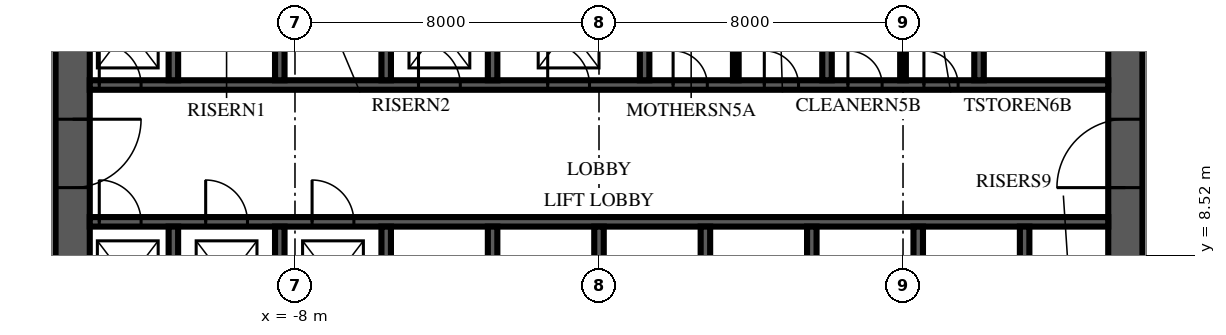
"""IFC4 building model, lengths in metres.
Left out: names, types, materials, properties, quantities, classifications, styles, units other than length and angle.
Written with IfcOpenShell. Run it as: python <this file> out.ifc"""

import sys

from ifc_helpers import new_model, si_unit, direction, frame, frame_2d, origin, place, context, subcontext, project, spatial, polyline, rectangle, outline, extrude, element, fill, save


model = new_model("IFC4")
c1 = context("Model", 3, precision=1e-05, world=origin(), true_north=direction((0.0, 1.0)))
c2 = subcontext(c1, "Body", "Model", "MODEL_VIEW")
j1 = project(units=[si_unit("LENGTHUNIT", "METRE"), si_unit("PLANEANGLEUNIT", "RADIAN")], contexts=[c1])
p1 = place(None, origin())
s1 = spatial("IfcSite", under=j1, at=p1, CompositionType="ELEMENT")
p2 = place(p1, origin())
s2 = spatial("IfcBuilding", under=s1, at=p2, CompositionType="ELEMENT")
p3 = place(p2, frame((0.0, 0.0, 36.0)))
s3 = spatial("IfcBuildingStorey", under=s2, at=p3, CompositionType="ELEMENT", Elevation=36.0)
p4 = place(p3, frame((13.85, 6.15, 0.0), z_axis=(0.0, 0.0, 1.0), x_axis=(0.0, 1.0, 0.0)))
e1 = element("IfcWall", 1, at=p4, inside=s3, PredefinedType="SHEAR", context=c2, shape_type="SweptSolid", body=[
    extrude(outline(polyline([(0.0, -0.45), (17.7, -0.45), (17.7, 0.0), (17.25, 0.0), (17.25, 0.45), (0.45, 0.45), (0.45, 0.0), (0.0, 0.0), (0.0, -0.45)])), origin(), (0.0, 0.0, 1.0), 4.0),
])
p5 = place(p4, frame((4.15, 0.0, 0.0)))
e2 = element("IfcOpeningElement", 2, at=p5, cuts=e1, PredefinedType="OPENING", context=c2, shape_type="SweptSolid", body=[
    extrude(rectangle(XDim=1.8, YDim=2.4, at=frame_2d((0.9, 1.2))), frame((0.0, 0.465, 0.0), z_axis=(0.0, -1.0, 0.0), x_axis=(1.0, 0.0, 0.0)), (0.0, 0.0, 1.0), 0.93),
])
p6 = place(p3, frame((-13.85, 23.85, 0.0), z_axis=(0.0, 0.0, 1.0), x_axis=(0.0, -1.0, 0.0)))
e3 = element("IfcWall", 3, at=p6, inside=s3, PredefinedType="SHEAR", context=c2, shape_type="SweptSolid", body=[
    extrude(outline(polyline([(0.0, -0.45), (17.7, -0.45), (17.7, 0.0), (17.25, 0.0), (17.25, 0.45), (0.45, 0.45), (0.45, 0.0), (0.0, 0.0), (0.0, -0.45)])), origin(), (0.0, 0.0, 1.0), 4.0),
])
p7 = place(p6, frame((11.75, 0.0, 0.0)))
e4 = element("IfcOpeningElement", 4, at=p7, cuts=e3, PredefinedType="OPENING", context=c2, shape_type="SweptSolid", body=[
    extrude(rectangle(XDim=1.8, YDim=2.4, at=frame_2d((0.9, 1.2))), frame((0.0, 0.465, 0.0), z_axis=(0.0, -1.0, 0.0), x_axis=(1.0, 0.0, 0.0)), (0.0, 0.0, 1.0), 0.93),
])
p8 = place(p3, frame((-13.4, 9.4, 0.0), z_axis=(0.0, 0.0, 1.0), x_axis=(1.0, 0.0, 0.0)))
e5 = element("IfcWall", 5, at=p8, inside=s3, PredefinedType="SHEAR", context=c2, shape_type="SweptSolid", body=[
    extrude(rectangle(XDim=26.8, YDim=0.25, at=frame_2d((13.4, 0.0))), origin(), (0.0, 0.0, 1.0), 4.0),
])
p9 = place(p8, frame((0.25, 0.0, 0.0)))
e6 = element("IfcOpeningElement", 6, at=p9, cuts=e5, PredefinedType="OPENING", context=c2, shape_type="SweptSolid", body=[
    extrude(rectangle(XDim=1.1, YDim=2.1, at=frame_2d((0.55, 1.05))), frame((0.0, 0.14, 0.0), z_axis=(0.0, -1.0, 0.0), x_axis=(1.0, 0.0, 0.0)), (0.0, 0.0, 1.0), 0.28),
])
p10 = place(p8, frame((3.05, 0.0, 0.0)))
e7 = element("IfcOpeningElement", 7, at=p10, cuts=e5, PredefinedType="OPENING", context=c2, shape_type="SweptSolid", body=[
    extrude(rectangle(XDim=1.1, YDim=2.1, at=frame_2d((0.55, 1.05))), frame((0.0, 0.14, 0.0), z_axis=(0.0, -1.0, 0.0), x_axis=(1.0, 0.0, 0.0)), (0.0, 0.0, 1.0), 0.28),
])
p11 = place(p8, frame((5.85, 0.0, 0.0)))
e8 = element("IfcOpeningElement", 8, at=p11, cuts=e5, PredefinedType="OPENING", context=c2, shape_type="SweptSolid", body=[
    extrude(rectangle(XDim=1.1, YDim=2.1, at=frame_2d((0.55, 1.05))), frame((0.0, 0.14, 0.0), z_axis=(0.0, -1.0, 0.0), x_axis=(1.0, 0.0, 0.0)), (0.0, 0.0, 1.0), 0.28),
])
p12 = place(p3, frame((-13.4, 13.0, 0.0), z_axis=(0.0, 0.0, 1.0), x_axis=(1.0, 0.0, 0.0)))
e9 = element("IfcWall", 9, at=p12, inside=s3, PredefinedType="SHEAR", context=c2, shape_type="SweptSolid", body=[
    extrude(rectangle(XDim=26.8, YDim=0.25, at=frame_2d((13.4, 0.0))), origin(), (0.0, 0.0, 1.0), 4.0),
])
p13 = place(p12, frame((0.25, 0.0, 0.0)))
e10 = element("IfcOpeningElement", 10, at=p13, cuts=e9, PredefinedType="OPENING", context=c2, shape_type="SweptSolid", body=[
    extrude(rectangle(XDim=1.1, YDim=2.1, at=frame_2d((0.55, 1.05))), frame((0.0, 0.14, 0.0), z_axis=(0.0, -1.0, 0.0), x_axis=(1.0, 0.0, 0.0)), (0.0, 0.0, 1.0), 0.28),
])
p14 = place(p12, frame((8.65, 0.0, 0.0)))
e11 = element("IfcOpeningElement", 11, at=p14, cuts=e9, PredefinedType="OPENING", context=c2, shape_type="SweptSolid", body=[
    extrude(rectangle(XDim=1.1, YDim=2.1, at=frame_2d((0.55, 1.05))), frame((0.0, 0.14, 0.0), z_axis=(0.0, -1.0, 0.0), x_axis=(1.0, 0.0, 0.0)), (0.0, 0.0, 1.0), 0.28),
])
p15 = place(p12, frame((12.05, 0.0, 0.0)))
e12 = element("IfcOpeningElement", 12, at=p15, cuts=e9, PredefinedType="OPENING", context=c2, shape_type="SweptSolid", body=[
    extrude(rectangle(XDim=1.1, YDim=2.1, at=frame_2d((0.55, 1.05))), frame((0.0, 0.14, 0.0), z_axis=(0.0, -1.0, 0.0), x_axis=(1.0, 0.0, 0.0)), (0.0, 0.0, 1.0), 0.28),
])
p16 = place(p12, frame((15.35, 0.0, 0.0)))
e13 = element("IfcOpeningElement", 13, at=p16, cuts=e9, PredefinedType="OPENING", context=c2, shape_type="SweptSolid", body=[
    extrude(rectangle(XDim=0.9, YDim=2.1, at=frame_2d((0.45, 1.05))), frame((0.0, 0.14, 0.0), z_axis=(0.0, -1.0, 0.0), x_axis=(1.0, 0.0, 0.0)), (0.0, 0.0, 1.0), 0.28),
])
p17 = place(p12, frame((17.75, 0.0, 0.0)))
e14 = element("IfcOpeningElement", 14, at=p17, cuts=e9, PredefinedType="OPENING", context=c2, shape_type="SweptSolid", body=[
    extrude(rectangle(XDim=0.9, YDim=2.1, at=frame_2d((0.45, 1.05))), frame((0.0, 0.14, 0.0), z_axis=(0.0, -1.0, 0.0), x_axis=(1.0, 0.0, 0.0)), (0.0, 0.0, 1.0), 0.28),
])
p18 = place(p12, frame((19.95, 0.0, 0.0)))
e15 = element("IfcOpeningElement", 15, at=p18, cuts=e9, PredefinedType="OPENING", context=c2, shape_type="SweptSolid", body=[
    extrude(rectangle(XDim=0.9, YDim=2.1, at=frame_2d((0.45, 1.05))), frame((0.0, 0.14, 0.0), z_axis=(0.0, -1.0, 0.0), x_axis=(1.0, 0.0, 0.0)), (0.0, 0.0, 1.0), 0.28),
])
p19 = place(p12, frame((21.95, 0.0, 0.0)))
e16 = element("IfcOpeningElement", 16, at=p19, cuts=e9, PredefinedType="OPENING", context=c2, shape_type="SweptSolid", body=[
    extrude(rectangle(XDim=0.9, YDim=2.1, at=frame_2d((0.45, 1.05))), frame((0.0, 0.14, 0.0), z_axis=(0.0, -1.0, 0.0), x_axis=(1.0, 0.0, 0.0)), (0.0, 0.0, 1.0), 0.28),
])
for number, where, z_axis, x_axis in (
    (17, (-11.2, 6.6, 0.0), (0.0, 0.0, 1.0), (0.0, 1.0, 0.0)),
    (18, (-8.4, 6.6, 0.0), (0.0, 0.0, 1.0), (0.0, 1.0, 0.0)),
    (19, (-5.6, 6.6, 0.0), (0.0, 0.0, 1.0), (0.0, 1.0, 0.0)),
    (20, (-2.8, 6.6, 0.0), (0.0, 0.0, 1.0), (0.0, 1.0, 0.0)),
    (21, (0.0, 6.6, 0.0), (0.0, 0.0, 1.0), (0.0, 1.0, 0.0)),
    (22, (2.8, 6.6, 0.0), (0.0, 0.0, 1.0), (0.0, 1.0, 0.0)),
    (23, (5.6, 6.6, 0.0), (0.0, 0.0, 1.0), (0.0, 1.0, 0.0)),
    (24, (8.4, 6.6, 0.0), (0.0, 0.0, 1.0), (0.0, 1.0, 0.0)),
    (25, (11.2, 6.6, 0.0), (0.0, 0.0, 1.0), (0.0, 1.0, 0.0)),
):
    element("IfcWall", number, at=place(p3, frame(where, z_axis=z_axis, x_axis=x_axis)), inside=s3, PredefinedType="SHEAR", context=c2, shape_type="SweptSolid", body=[
        extrude(rectangle(XDim=2.675, YDim=0.25, at=frame_2d((1.337, 0.0))), origin(), (0.0, 0.0, 1.0), 4.0),
    ])
for number, where, z_axis, x_axis in (
    (26, (-11.2, 13.125, 0.0), (0.0, 0.0, 1.0), (0.0, 1.0, 0.0)),
    (27, (-8.4, 13.125, 0.0), (0.0, 0.0, 1.0), (0.0, 1.0, 0.0)),
    (28, (-5.6, 13.125, 0.0), (0.0, 0.0, 1.0), (0.0, 1.0, 0.0)),
    (29, (-2.8, 13.125, 0.0), (0.0, 0.0, 1.0), (0.0, 1.0, 0.0)),
    (30, (1.2, 13.125, 0.0), (0.0, 0.0, 1.0), (0.0, 1.0, 0.0)),
    (31, (6.0, 13.125, 0.0), (0.0, 0.0, 1.0), (0.0, 1.0, 0.0)),
    (32, (10.0, 13.125, 0.0), (0.0, 0.0, 1.0), (0.0, 1.0, 0.0)),
):
    element("IfcWall", number, at=place(p3, frame(where, z_axis=z_axis, x_axis=x_axis)), inside=s3, PredefinedType="SHEAR", context=c2, shape_type="SweptSolid", body=[
        extrude(rectangle(XDim=2.75, YDim=0.25, at=frame_2d((1.375, 0.0))), origin(), (0.0, 0.0, 1.0), 4.0),
    ])
for number, where, z_axis, x_axis in (
    (33, (3.6, 13.125, 0.0), (0.0, 0.0, 1.0), (0.0, 1.0, 0.0)),
    (34, (8.0, 13.125, 0.0), (0.0, 0.0, 1.0), (0.0, 1.0, 0.0)),
):
    element("IfcWall", number, at=place(p3, frame(where, z_axis=z_axis, x_axis=x_axis)), inside=s3, PredefinedType="PARTITIONING", context=c2, shape_type="SweptSolid", body=[
        extrude(rectangle(XDim=2.75, YDim=0.15, at=frame_2d((1.375, 0.0))), origin(), (0.0, 0.0, 1.0), 3.85),
    ])
p20 = place(p5, origin())
e35 = element("IfcDoor", 35, at=p20, inside=s3, OperationType="DOUBLE_DOOR_SINGLE_SWING", PredefinedType="DOOR", context=c2, shape_type="SweptSolid", body=[
    extrude(rectangle(XDim=1.8, YDim=2.4, at=frame_2d((0.9, 1.2))), frame((0.0, 0.45, 0.0), z_axis=(0.0, -1.0, 0.0), x_axis=(1.0, 0.0, 0.0)), (0.0, 0.0, 1.0), 0.899),
])
fill(e2, e35)
p21 = place(p7, origin())
e36 = element("IfcDoor", 36, at=p21, inside=s3, OperationType="DOUBLE_DOOR_SINGLE_SWING", PredefinedType="DOOR", context=c2, shape_type="SweptSolid", body=[
    extrude(rectangle(XDim=1.8, YDim=2.4, at=frame_2d((0.9, 1.2))), frame((0.0, 0.45, 0.0), z_axis=(0.0, -1.0, 0.0), x_axis=(1.0, 0.0, 0.0)), (0.0, 0.0, 1.0), 0.899),
])
fill(e4, e36)
p22 = place(p9, origin())
e37 = element("IfcDoor", 37, at=p22, inside=s3, OperationType="SLIDING_TO_LEFT", PredefinedType="DOOR", context=c2, shape_type="SweptSolid", body=[
    extrude(rectangle(XDim=1.1, YDim=2.1, at=frame_2d((0.55, 1.05))), frame((0.0, 0.125, 0.0), z_axis=(0.0, -1.0, 0.0), x_axis=(1.0, 0.0, 0.0)), (0.0, 0.0, 1.0), 0.25),
])
fill(e6, e37)
p23 = place(p10, origin())
e38 = element("IfcDoor", 38, at=p23, inside=s3, OperationType="SLIDING_TO_LEFT", PredefinedType="DOOR", context=c2, shape_type="SweptSolid", body=[
    extrude(rectangle(XDim=1.1, YDim=2.1, at=frame_2d((0.55, 1.05))), frame((0.0, 0.125, 0.0), z_axis=(0.0, -1.0, 0.0), x_axis=(1.0, 0.0, 0.0)), (0.0, 0.0, 1.0), 0.25),
])
fill(e7, e38)
p24 = place(p11, origin())
e39 = element("IfcDoor", 39, at=p24, inside=s3, OperationType="SLIDING_TO_LEFT", PredefinedType="DOOR", context=c2, shape_type="SweptSolid", body=[
    extrude(rectangle(XDim=1.1, YDim=2.1, at=frame_2d((0.55, 1.05))), frame((0.0, 0.125, 0.0), z_axis=(0.0, -1.0, 0.0), x_axis=(1.0, 0.0, 0.0)), (0.0, 0.0, 1.0), 0.25),
])
fill(e8, e39)
p25 = place(p13, origin())
e40 = element("IfcDoor", 40, at=p25, inside=s3, OperationType="SLIDING_TO_LEFT", PredefinedType="DOOR", context=c2, shape_type="SweptSolid", body=[
    extrude(rectangle(XDim=1.1, YDim=2.1, at=frame_2d((0.55, 1.05))), frame((0.0, 0.125, 0.0), z_axis=(0.0, -1.0, 0.0), x_axis=(1.0, 0.0, 0.0)), (0.0, 0.0, 1.0), 0.25),
])
fill(e10, e40)
p26 = place(p14, origin())
e41 = element("IfcDoor", 41, at=p26, inside=s3, OperationType="SLIDING_TO_LEFT", PredefinedType="DOOR", context=c2, shape_type="SweptSolid", body=[
    extrude(rectangle(XDim=1.1, YDim=2.1, at=frame_2d((0.55, 1.05))), frame((0.0, 0.125, 0.0), z_axis=(0.0, -1.0, 0.0), x_axis=(1.0, 0.0, 0.0)), (0.0, 0.0, 1.0), 0.25),
])
fill(e11, e41)
p27 = place(p15, origin())
e42 = element("IfcDoor", 42, at=p27, inside=s3, OperationType="SLIDING_TO_LEFT", PredefinedType="DOOR", context=c2, shape_type="SweptSolid", body=[
    extrude(rectangle(XDim=1.1, YDim=2.1, at=frame_2d((0.55, 1.05))), frame((0.0, 0.125, 0.0), z_axis=(0.0, -1.0, 0.0), x_axis=(1.0, 0.0, 0.0)), (0.0, 0.0, 1.0), 0.25),
])
fill(e12, e42)
p28 = place(p16, origin())
e43 = element("IfcDoor", 43, at=p28, inside=s3, OperationType="SINGLE_SWING_LEFT", PredefinedType="DOOR", context=c2, shape_type="SweptSolid", body=[
    extrude(rectangle(XDim=0.9, YDim=2.1, at=frame_2d((0.45, 1.05))), frame((0.0, 0.125, 0.0), z_axis=(0.0, -1.0, 0.0), x_axis=(1.0, 0.0, 0.0)), (0.0, 0.0, 1.0), 0.25),
])
fill(e13, e43)
p29 = place(p17, origin())
e44 = element("IfcDoor", 44, at=p29, inside=s3, OperationType="SINGLE_SWING_LEFT", PredefinedType="DOOR", context=c2, shape_type="SweptSolid", body=[
    extrude(rectangle(XDim=0.9, YDim=2.1, at=frame_2d((0.45, 1.05))), frame((0.0, 0.125, 0.0), z_axis=(0.0, -1.0, 0.0), x_axis=(1.0, 0.0, 0.0)), (0.0, 0.0, 1.0), 0.25),
])
fill(e14, e44)
p30 = place(p18, origin())
e45 = element("IfcDoor", 45, at=p30, inside=s3, OperationType="SINGLE_SWING_LEFT", PredefinedType="DOOR", context=c2, shape_type="SweptSolid", body=[
    extrude(rectangle(XDim=0.9, YDim=2.1, at=frame_2d((0.45, 1.05))), frame((0.0, 0.125, 0.0), z_axis=(0.0, -1.0, 0.0), x_axis=(1.0, 0.0, 0.0)), (0.0, 0.0, 1.0), 0.25),
])
fill(e15, e45)
p31 = place(p19, origin())
e46 = element("IfcDoor", 46, at=p31, inside=s3, OperationType="SINGLE_SWING_LEFT", PredefinedType="DOOR", context=c2, shape_type="SweptSolid", body=[
    extrude(rectangle(XDim=0.9, YDim=2.1, at=frame_2d((0.45, 1.05))), frame((0.0, 0.125, 0.0), z_axis=(0.0, -1.0, 0.0), x_axis=(1.0, 0.0, 0.0)), (0.0, 0.0, 1.0), 0.25),
])
fill(e16, e46)
save(model, sys.argv[1])
